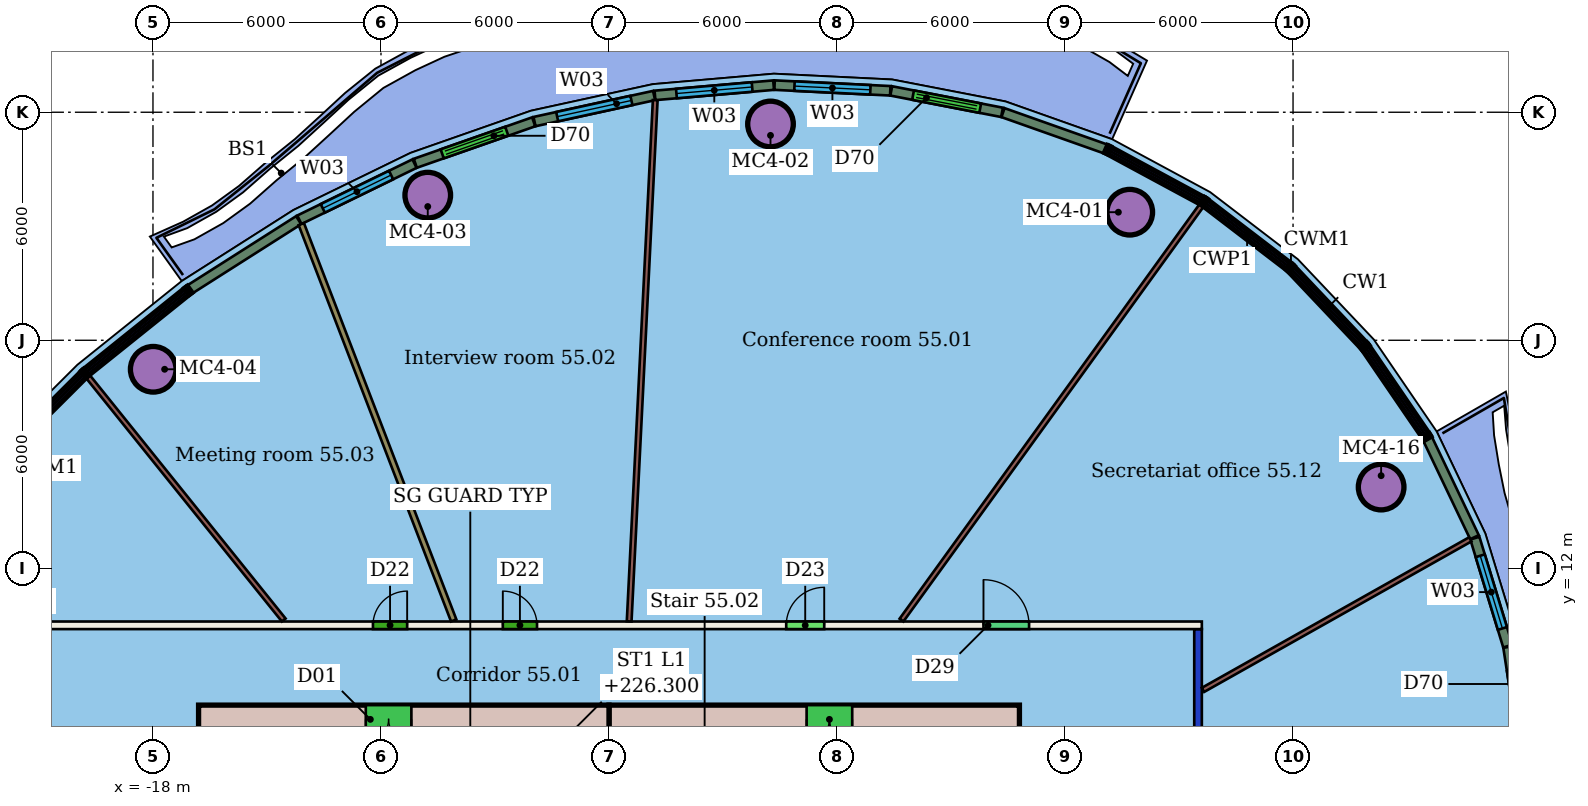
"""IFC4 building model, lengths in metres.
Left out: names, types, materials, properties, quantities, classifications, styles, units other than length and angle.
Written with IfcOpenShell. Run it as: python <this file> out.ifc"""

import sys

from ifc_helpers import new_model, si_unit, direction, frame, frame_2d, origin, origin_2d, place, context, subcontext, project, spatial, rectangle, hollow_circle, extrude, element, fill, save


model = new_model("IFC4")
c1 = context("Model", 3, precision=1e-05, world=origin(), true_north=direction((0.0, 1.0)))
c2 = subcontext(c1, "Body", "Model", "MODEL_VIEW")
j1 = project(units=[si_unit("LENGTHUNIT", "METRE"), si_unit("PLANEANGLEUNIT", "RADIAN")], contexts=[c1])
p1 = place(None, origin())
s1 = spatial("IfcSite", under=j1, at=p1, CompositionType="ELEMENT")
p2 = place(p1, origin())
s2 = spatial("IfcBuilding", under=s1, at=p2, CompositionType="ELEMENT")
p3 = place(p2, frame((0.0, 0.0, 224.5)))
s3 = spatial("IfcBuildingStorey", under=s2, at=p3, CompositionType="ELEMENT", Elevation=224.5)
for number, where, z_axis, x_axis in (
    (1, (7.704, 21.37, 0.0), (0.0, 0.0, 1.0), (1.0, 0.0, 0.0)),
    (2, (-1.75, 23.691, 0.0), (0.0, 0.0, 1.0), (1.0, 0.0, 0.0)),
    (3, (-10.769, 21.819, 0.0), (0.0, 0.0, 1.0), (1.0, 0.0, 0.0)),
    (4, (-17.993, 17.237, 0.0), (0.0, 0.0, 1.0), (1.0, 0.0, 0.0)),
    (5, (14.318, 14.137, 0.0), (0.0, 0.0, 1.0), (1.0, 0.0, 0.0)),
):
    element("IfcColumn", number, at=place(p3, frame(where, z_axis=z_axis, x_axis=x_axis)), inside=s3, PredefinedType="COLUMN", context=c2, shape_type="SweptSolid", body=[
        extrude(hollow_circle(Radius=0.6, WallThickness=0.045, at=origin_2d()), origin(), (0.0, 0.0, 1.0), 3.45),
    ])
p4 = place(p3, frame((-21.6, 10.5, 0.0), z_axis=(0.0, 0.0, 1.0), x_axis=(1.0, 0.0, 0.0)))
e6 = element("IfcWall", 6, at=p4, inside=s3, PredefinedType="PARTITIONING", context=c2, shape_type="SweptSolid", body=[
    extrude(rectangle(XDim=31.2, YDim=0.2, at=frame_2d((15.6, 0.0))), origin(), (0.0, 0.0, 1.0), 3.45),
])
p5 = place(p4, frame((20.263, 0.0, 0.0)))
e7 = element("IfcOpeningElement", 7, at=p5, cuts=e6, PredefinedType="OPENING", context=c2, shape_type="SweptSolid", body=[
    extrude(rectangle(XDim=1.0, YDim=2.4, at=frame_2d((0.5, 1.2))), frame((0.0, 0.11, 0.0), z_axis=(0.0, -1.0, 0.0), x_axis=(1.0, 0.0, 0.0)), (0.0, 0.0, 1.0), 0.22),
])
p6 = place(p4, frame((12.806, 0.0, 0.0)))
e8 = element("IfcOpeningElement", 8, at=p6, cuts=e6, PredefinedType="OPENING", context=c2, shape_type="SweptSolid", body=[
    extrude(rectangle(XDim=0.9, YDim=2.1, at=frame_2d((0.45, 1.05))), frame((0.0, 0.11, 0.0), z_axis=(0.0, -1.0, 0.0), x_axis=(1.0, 0.0, 0.0)), (0.0, 0.0, 1.0), 0.22),
])
p7 = place(p4, frame((9.389, 0.0, 0.0)))
e9 = element("IfcOpeningElement", 9, at=p7, cuts=e6, PredefinedType="OPENING", context=c2, shape_type="SweptSolid", body=[
    extrude(rectangle(XDim=0.9, YDim=2.1, at=frame_2d((0.45, 1.05))), frame((0.0, 0.11, 0.0), z_axis=(0.0, -1.0, 0.0), x_axis=(1.0, 0.0, 0.0)), (0.0, 0.0, 1.0), 0.22),
])
p8 = place(p4, frame((25.454, 0.0, 0.0)))
e10 = element("IfcOpeningElement", 10, at=p8, cuts=e6, PredefinedType="OPENING", context=c2, shape_type="SweptSolid", body=[
    extrude(rectangle(XDim=1.2, YDim=2.4, at=frame_2d((0.6, 1.2))), frame((0.0, 0.11, 0.0), z_axis=(0.0, -1.0, 0.0), x_axis=(1.0, 0.0, 0.0)), (0.0, 0.0, 1.0), 0.22),
])
p9 = place(p3, frame((9.5, 10.4, 0.0), z_axis=(0.0, 0.0, 1.0), x_axis=(0.0, -1.0, 0.0)))
e11 = element("IfcWall", 11, at=p9, inside=s3, PredefinedType="PARTITIONING", context=c2, shape_type="SweptSolid", body=[
    extrude(rectangle(XDim=20.8, YDim=0.2, at=frame_2d((10.4, 0.0))), origin(), (0.0, 0.0, 1.0), 3.05),
])
p10 = place(p9, frame((13.631, 0.0, 0.0)))
e12 = element("IfcOpeningElement", 12, at=p10, cuts=e11, PredefinedType="OPENING", context=c2, shape_type="SweptSolid", body=[
    extrude(rectangle(XDim=0.9, YDim=2.1, at=frame_2d((0.45, 1.05))), frame((0.0, 0.11, 0.0), z_axis=(0.0, -1.0, 0.0), x_axis=(1.0, 0.0, 0.0)), (0.0, 0.0, 1.0), 0.22),
])
p11 = place(p9, frame((7.823, 0.0, 0.0)))
e13 = element("IfcOpeningElement", 13, at=p11, cuts=e11, PredefinedType="OPENING", context=c2, shape_type="SweptSolid", body=[
    extrude(rectangle(XDim=1.5, YDim=2.1, at=frame_2d((0.75, 1.05))), frame((0.0, 0.11, 0.0), z_axis=(0.0, -1.0, 0.0), x_axis=(1.0, 0.0, 0.0)), (0.0, 0.0, 1.0), 0.22),
])
p12 = place(p3, frame((9.588, 21.542, 0.0), z_axis=(0.0, 0.0, 1.0), x_axis=(-0.586235299026, -0.810140836013, 0.0)))
e14 = element("IfcWall", 14, at=p12, inside=s3, PredefinedType="PARTITIONING", context=c2, shape_type="SweptSolid", body=[
    extrude(rectangle(XDim=13.461, YDim=0.125, at=frame_2d((6.73, 0.0))), origin(), (0.0, 0.0, 1.0), 3.45),
])
p13 = place(p3, frame((-4.783, 24.319, 0.0), z_axis=(0.0, 0.0, 1.0), x_axis=(-0.049956237306, -0.998751407686, 0.0)))
e15 = element("IfcWall", 15, at=p13, inside=s3, PredefinedType="PARTITIONING", context=c2, shape_type="SweptSolid", body=[
    extrude(rectangle(XDim=13.733, YDim=0.125, at=frame_2d((6.866, 0.0))), origin(), (0.0, 0.0, 1.0), 3.45),
])
p14 = place(p3, frame((-14.097, 21.057, 0.0), z_axis=(0.0, 0.0, 1.0), x_axis=(0.358907338181, -0.93337319578, 0.0)))
e16 = element("IfcWall", 16, at=p14, inside=s3, PredefinedType="PARTITIONING", context=c2, shape_type="SweptSolid", body=[
    extrude(rectangle(XDim=11.174, YDim=0.15, at=frame_2d((5.587, 0.0))), origin(), (0.0, 0.0, 1.0), 3.45),
])
p15 = place(p3, frame((-19.706, 17.038, 0.0), z_axis=(0.0, 0.0, 1.0), x_axis=(0.626795529624, -0.77918378066, 0.0)))
e17 = element("IfcWall", 17, at=p15, inside=s3, PredefinedType="PARTITIONING", context=c2, shape_type="SweptSolid", body=[
    extrude(rectangle(XDim=8.212, YDim=0.125, at=frame_2d((4.106, 0.0))), origin(), (0.0, 0.0, 1.0), 3.45),
])
p16 = place(p3, frame((16.664, 12.761, 0.0), z_axis=(0.0, 0.0, 1.0), x_axis=(-0.871369479299, -0.490627384627, 0.0)))
e18 = element("IfcWall", 18, at=p16, inside=s3, PredefinedType="PARTITIONING", context=c2, shape_type="SweptSolid", body=[
    extrude(rectangle(XDim=8.072, YDim=0.125, at=frame_2d((4.036, 0.0))), origin(), (0.0, 0.0, 1.0), 3.45),
])
p17 = place(p3, frame((7.066, 23.035, 0.0), z_axis=(0.0, 0.0, 1.0), x_axis=(-0.942660771922, 0.333752406852, 0.0)))
e19 = element("IfcWall", 19, at=p17, inside=s3, PredefinedType="SOLIDWALL", context=c2, shape_type="SweptSolid", body=[
    extrude(rectangle(XDim=2.862, YDim=0.25, at=frame_2d((1.431, 0.0))), origin(), (0.0, 0.0, 1.0), 3.1),
])
p18 = place(p3, frame((4.342, 23.997, 0.0), z_axis=(0.0, 0.0, 1.0), x_axis=(-0.981754609907, 0.190152270366, 0.0)))
e20 = element("IfcWall", 20, at=p18, inside=s3, PredefinedType="SOLIDWALL", context=c2, shape_type="SweptSolid", body=[
    extrude(rectangle(XDim=2.97, YDim=0.25, at=frame_2d((1.485, 0.0))), origin(), (0.0, 0.0, 1.0), 3.1),
])
p19 = place(p18, frame((0.585, 0.0, 0.0)))
e21 = element("IfcOpeningElement", 21, at=p19, cuts=e20, PredefinedType="OPENING", context=c2, shape_type="SweptSolid", body=[
    extrude(rectangle(XDim=1.8, YDim=2.4, at=frame_2d((0.9, 1.2))), frame((0.0, 0.135, 0.0), z_axis=(0.0, -1.0, 0.0), x_axis=(1.0, 0.0, 0.0)), (0.0, 0.0, 1.0), 0.27),
])
p20 = place(p3, frame((1.401, 24.565, 0.0), z_axis=(0.0, 0.0, 1.0), x_axis=(-0.99880196675, 0.048934969263, 0.0)))
e22 = element("IfcWall", 22, at=p20, inside=s3, PredefinedType="SOLIDWALL", context=c2, shape_type="SweptSolid", body=[
    extrude(rectangle(XDim=3.048, YDim=0.25, at=frame_2d((1.524, 0.0))), origin(), (0.0, 0.0, 1.0), 3.1),
])
p21 = place(p20, frame((0.524, 0.0, 0.9)))
e23 = element("IfcOpeningElement", 23, at=p21, cuts=e22, PredefinedType="OPENING", context=c2, shape_type="SweptSolid", body=[
    extrude(rectangle(XDim=2.0, YDim=2.1, at=frame_2d((1.0, 1.05))), frame((0.0, 0.135, 0.0), z_axis=(0.0, -1.0, 0.0), x_axis=(1.0, 0.0, 0.0)), (0.0, 0.0, 1.0), 0.27),
])
p22 = place(p3, frame((-1.668, 24.713, 0.0), z_axis=(0.0, 0.0, 1.0), x_axis=(-0.996280822504, -0.086165670135, 0.0)))
e24 = element("IfcWall", 24, at=p22, inside=s3, PredefinedType="SOLIDWALL", context=c2, shape_type="SweptSolid", body=[
    extrude(rectangle(XDim=3.134, YDim=0.25, at=frame_2d((1.567, 0.0))), origin(), (0.0, 0.0, 1.0), 3.1),
])
p23 = place(p22, frame((0.567, 0.0, 0.9)))
e25 = element("IfcOpeningElement", 25, at=p23, cuts=e24, PredefinedType="OPENING", context=c2, shape_type="SweptSolid", body=[
    extrude(rectangle(XDim=2.0, YDim=2.1, at=frame_2d((1.0, 1.05))), frame((0.0, 0.135, 0.0), z_axis=(0.0, -1.0, 0.0), x_axis=(1.0, 0.0, 0.0)), (0.0, 0.0, 1.0), 0.27),
])
p24 = place(p3, frame((-4.814, 24.44, 0.0), z_axis=(0.0, 0.0, 1.0), x_axis=(-0.977051639929, -0.213002565507, 0.0)))
e26 = element("IfcWall", 26, at=p24, inside=s3, PredefinedType="SOLIDWALL", context=c2, shape_type="SweptSolid", body=[
    extrude(rectangle(XDim=3.22, YDim=0.25, at=frame_2d((1.61, 0.0))), origin(), (0.0, 0.0, 1.0), 3.1),
])
p25 = place(p24, frame((0.61, 0.0, 0.9)))
e27 = element("IfcOpeningElement", 27, at=p25, cuts=e26, PredefinedType="OPENING", context=c2, shape_type="SweptSolid", body=[
    extrude(rectangle(XDim=2.0, YDim=2.1, at=frame_2d((1.0, 1.05))), frame((0.0, 0.135, 0.0), z_axis=(0.0, -1.0, 0.0), x_axis=(1.0, 0.0, 0.0)), (0.0, 0.0, 1.0), 0.27),
])
p26 = place(p3, frame((-7.982, 23.748, 0.0), z_axis=(0.0, 0.0, 1.0), x_axis=(-0.943819136109, -0.330462461279, 0.0)))
e28 = element("IfcWall", 28, at=p26, inside=s3, PredefinedType="SOLIDWALL", context=c2, shape_type="SweptSolid", body=[
    extrude(rectangle(XDim=3.3, YDim=0.25, at=frame_2d((1.65, 0.0))), origin(), (0.0, 0.0, 1.0), 3.1),
])
p27 = place(p26, frame((0.75, 0.0, 0.0)))
e29 = element("IfcOpeningElement", 29, at=p27, cuts=e28, PredefinedType="OPENING", context=c2, shape_type="SweptSolid", body=[
    extrude(rectangle(XDim=1.8, YDim=2.4, at=frame_2d((0.9, 1.2))), frame((0.0, 0.135, 0.0), z_axis=(0.0, -1.0, 0.0), x_axis=(1.0, 0.0, 0.0)), (0.0, 0.0, 1.0), 0.27),
])
p28 = place(p3, frame((-11.118, 22.648, 0.0), z_axis=(0.0, 0.0, 1.0), x_axis=(-0.898829687596, -0.43829806376, 0.0)))
e30 = element("IfcWall", 30, at=p28, inside=s3, PredefinedType="SOLIDWALL", context=c2, shape_type="SweptSolid", body=[
    extrude(rectangle(XDim=3.371, YDim=0.25, at=frame_2d((1.686, 0.0))), origin(), (0.0, 0.0, 1.0), 3.1),
])
p29 = place(p28, frame((0.686, 0.0, 0.9)))
e31 = element("IfcOpeningElement", 31, at=p29, cuts=e30, PredefinedType="OPENING", context=c2, shape_type="SweptSolid", body=[
    extrude(rectangle(XDim=2.0, YDim=2.1, at=frame_2d((1.0, 1.05))), frame((0.0, 0.135, 0.0), z_axis=(0.0, -1.0, 0.0), x_axis=(1.0, 0.0, 0.0)), (0.0, 0.0, 1.0), 0.27),
])
p30 = place(p3, frame((-14.167, 21.16, 0.0), z_axis=(0.0, 0.0, 1.0), x_axis=(-0.843780310555, -0.536688724979, 0.0)))
e32 = element("IfcWall", 32, at=p30, inside=s3, PredefinedType="SOLIDWALL", context=c2, shape_type="SweptSolid", body=[
    extrude(rectangle(XDim=3.384, YDim=0.25, at=frame_2d((1.692, 0.0))), origin(), (0.0, 0.0, 1.0), 3.1),
])
p31 = place(p3, frame((18.123, 6.916, 0.0), z_axis=(0.0, 0.0, 1.0), x_axis=(-0.15305011878, 0.98821842785, 0.0)))
e33 = element("IfcWall", 33, at=p31, inside=s3, PredefinedType="SOLIDWALL", context=c2, shape_type="SweptSolid", body=[
    extrude(rectangle(XDim=3.048, YDim=0.25, at=frame_2d((1.524, 0.0))), origin(), (0.0, 0.0, 1.0), 3.1),
])
p32 = place(p31, frame((0.624, 0.0, 0.0)))
e34 = element("IfcOpeningElement", 34, at=p32, cuts=e33, PredefinedType="OPENING", context=c2, shape_type="SweptSolid", body=[
    extrude(rectangle(XDim=1.8, YDim=2.4, at=frame_2d((0.9, 1.2))), frame((0.0, 0.135, 0.0), z_axis=(0.0, -1.0, 0.0), x_axis=(1.0, 0.0, 0.0)), (0.0, 0.0, 1.0), 0.27),
])
p33 = place(p3, frame((17.651, 9.954, 0.0), z_axis=(0.0, 0.0, 1.0), x_axis=(-0.291704653899, 0.956508439531, 0.0)))
e35 = element("IfcWall", 35, at=p33, inside=s3, PredefinedType="SOLIDWALL", context=c2, shape_type="SweptSolid", body=[
    extrude(rectangle(XDim=2.969, YDim=0.25, at=frame_2d((1.485, 0.0))), origin(), (0.0, 0.0, 1.0), 3.1),
])
p34 = place(p33, frame((0.485, 0.0, 0.9)))
e36 = element("IfcOpeningElement", 36, at=p34, cuts=e35, PredefinedType="OPENING", context=c2, shape_type="SweptSolid", body=[
    extrude(rectangle(XDim=2.0, YDim=2.1, at=frame_2d((1.0, 1.05))), frame((0.0, 0.135, 0.0), z_axis=(0.0, -1.0, 0.0), x_axis=(1.0, 0.0, 0.0)), (0.0, 0.0, 1.0), 0.27),
])
p35 = place(p3, frame((16.775, 12.819, 0.0), z_axis=(0.0, 0.0, 1.0), x_axis=(-0.430486422768, 0.902597052849, 0.0)))
e37 = element("IfcWall", 37, at=p35, inside=s3, PredefinedType="SOLIDWALL", context=c2, shape_type="SweptSolid", body=[
    extrude(rectangle(XDim=2.862, YDim=0.25, at=frame_2d((1.431, 0.0))), origin(), (0.0, 0.0, 1.0), 3.1),
])
p36 = place(p3, frame((4.8, 8.025, 0.0), z_axis=(0.0, 0.0, 1.0), x_axis=(-1.0, 0.0, 0.0)))
e38 = element("IfcWall", 38, at=p36, inside=s3, PredefinedType="SHEAR", context=c2, shape_type="SweptSolid", body=[
    extrude(rectangle(XDim=10.8, YDim=0.75, at=frame_2d((5.4, 0.0))), origin(), (0.0, 0.0, 1.0), 3.3),
])
p37 = place(p36, frame((4.4, 0.0, 0.0)))
e39 = element("IfcOpeningElement", 39, at=p37, cuts=e38, PredefinedType="OPENING", context=c2, shape_type="SweptSolid", body=[
    extrude(rectangle(XDim=1.2, YDim=2.1, at=frame_2d((0.6, 1.05))), frame((0.0, 0.385, 0.0), z_axis=(0.0, -1.0, 0.0), x_axis=(1.0, 0.0, 0.0)), (0.0, 0.0, 1.0), 0.77),
])
p38 = place(p3, frame((-6.0, 8.025, 0.0), z_axis=(0.0, 0.0, 1.0), x_axis=(-1.0, 0.0, 0.0)))
e40 = element("IfcWall", 40, at=p38, inside=s3, PredefinedType="SHEAR", context=c2, shape_type="SweptSolid", body=[
    extrude(rectangle(XDim=10.8, YDim=0.75, at=frame_2d((5.4, 0.0))), origin(), (0.0, 0.0, 1.0), 3.3),
])
p39 = place(p38, frame((5.2, 0.0, 0.0)))
e41 = element("IfcOpeningElement", 41, at=p39, cuts=e40, PredefinedType="OPENING", context=c2, shape_type="SweptSolid", body=[
    extrude(rectangle(XDim=1.2, YDim=2.1, at=frame_2d((0.6, 1.05))), frame((0.0, 0.385, 0.0), z_axis=(0.0, -1.0, 0.0), x_axis=(1.0, 0.0, 0.0)), (0.0, 0.0, 1.0), 0.77),
])
p40 = place(p5, origin())
e42 = element("IfcDoor", 42, at=p40, inside=s3, OperationType="SINGLE_SWING_RIGHT", PredefinedType="DOOR", context=c2, shape_type="SweptSolid", body=[
    extrude(rectangle(XDim=1.0, YDim=2.4, at=frame_2d((0.5, 1.2))), frame((0.0, 0.025, 0.0), z_axis=(0.0, -1.0, 0.0), x_axis=(1.0, 0.0, 0.0)), (0.0, 0.0, 1.0), 0.05),
])
fill(e7, e42)
p41 = place(p6, origin())
e43 = element("IfcDoor", 43, at=p41, inside=s3, OperationType="SINGLE_SWING_LEFT", PredefinedType="DOOR", context=c2, shape_type="SweptSolid", body=[
    extrude(rectangle(XDim=0.9, YDim=2.1, at=frame_2d((0.45, 1.05))), frame((0.0, 0.025, 0.0), z_axis=(0.0, -1.0, 0.0), x_axis=(1.0, 0.0, 0.0)), (0.0, 0.0, 1.0), 0.05),
])
fill(e8, e43)
p42 = place(p7, origin())
e44 = element("IfcDoor", 44, at=p42, inside=s3, OperationType="SINGLE_SWING_RIGHT", PredefinedType="DOOR", context=c2, shape_type="SweptSolid", body=[
    extrude(rectangle(XDim=0.9, YDim=2.1, at=frame_2d((0.45, 1.05))), frame((0.0, 0.025, 0.0), z_axis=(0.0, -1.0, 0.0), x_axis=(1.0, 0.0, 0.0)), (0.0, 0.0, 1.0), 0.05),
])
fill(e9, e44)
p43 = place(p8, origin())
e45 = element("IfcDoor", 45, at=p43, inside=s3, OperationType="SINGLE_SWING_LEFT", PredefinedType="DOOR", context=c2, shape_type="SweptSolid", body=[
    extrude(rectangle(XDim=1.2, YDim=2.4, at=frame_2d((0.6, 1.2))), frame((0.0, 0.025, 0.0), z_axis=(0.0, -1.0, 0.0), x_axis=(1.0, 0.0, 0.0)), (0.0, 0.0, 1.0), 0.05),
])
fill(e10, e45)
p44 = place(p19, origin())
e46 = element("IfcDoor", 46, at=p44, inside=s3, OperationType="DOUBLE_DOOR_SLIDING", PredefinedType="DOOR", context=c2, shape_type="SweptSolid", body=[
    extrude(rectangle(XDim=1.8, YDim=2.4, at=frame_2d((0.9, 1.2))), frame((0.0, 0.025, 0.0), z_axis=(0.0, -1.0, 0.0), x_axis=(1.0, 0.0, 0.0)), (0.0, 0.0, 1.0), 0.05),
])
fill(e21, e46)
p45 = place(p21, origin())
e47 = element("IfcWindow", 47, at=p45, inside=s3, PartitioningType="SINGLE_PANEL", PredefinedType="WINDOW", context=c2, shape_type="SweptSolid", body=[
    extrude(rectangle(XDim=2.0, YDim=2.1, at=frame_2d((1.0, 1.05))), frame((0.0, 0.03, 0.0), z_axis=(0.0, -1.0, 0.0), x_axis=(1.0, 0.0, 0.0)), (0.0, 0.0, 1.0), 0.06),
])
fill(e23, e47)
p46 = place(p23, origin())
e48 = element("IfcWindow", 48, at=p46, inside=s3, PartitioningType="SINGLE_PANEL", PredefinedType="WINDOW", context=c2, shape_type="SweptSolid", body=[
    extrude(rectangle(XDim=2.0, YDim=2.1, at=frame_2d((1.0, 1.05))), frame((0.0, 0.03, 0.0), z_axis=(0.0, -1.0, 0.0), x_axis=(1.0, 0.0, 0.0)), (0.0, 0.0, 1.0), 0.06),
])
fill(e25, e48)
p47 = place(p25, origin())
e49 = element("IfcWindow", 49, at=p47, inside=s3, PartitioningType="SINGLE_PANEL", PredefinedType="WINDOW", context=c2, shape_type="SweptSolid", body=[
    extrude(rectangle(XDim=2.0, YDim=2.1, at=frame_2d((1.0, 1.05))), frame((0.0, 0.03, 0.0), z_axis=(0.0, -1.0, 0.0), x_axis=(1.0, 0.0, 0.0)), (0.0, 0.0, 1.0), 0.06),
])
fill(e27, e49)
p48 = place(p27, origin())
e50 = element("IfcDoor", 50, at=p48, inside=s3, OperationType="DOUBLE_DOOR_SLIDING", PredefinedType="DOOR", context=c2, shape_type="SweptSolid", body=[
    extrude(rectangle(XDim=1.8, YDim=2.4, at=frame_2d((0.9, 1.2))), frame((0.0, 0.025, 0.0), z_axis=(0.0, -1.0, 0.0), x_axis=(1.0, 0.0, 0.0)), (0.0, 0.0, 1.0), 0.05),
])
fill(e29, e50)
p49 = place(p29, origin())
e51 = element("IfcWindow", 51, at=p49, inside=s3, PartitioningType="SINGLE_PANEL", PredefinedType="WINDOW", context=c2, shape_type="SweptSolid", body=[
    extrude(rectangle(XDim=2.0, YDim=2.1, at=frame_2d((1.0, 1.05))), frame((0.0, 0.03, 0.0), z_axis=(0.0, -1.0, 0.0), x_axis=(1.0, 0.0, 0.0)), (0.0, 0.0, 1.0), 0.06),
])
fill(e31, e51)
p50 = place(p34, origin())
e52 = element("IfcWindow", 52, at=p50, inside=s3, PartitioningType="SINGLE_PANEL", PredefinedType="WINDOW", context=c2, shape_type="SweptSolid", body=[
    extrude(rectangle(XDim=2.0, YDim=2.1, at=frame_2d((1.0, 1.05))), frame((0.0, 0.03, 0.0), z_axis=(0.0, -1.0, 0.0), x_axis=(1.0, 0.0, 0.0)), (0.0, 0.0, 1.0), 0.06),
])
fill(e36, e52)
p51 = place(p37, origin())
e53 = element("IfcDoor", 53, at=p51, inside=s3, OperationType="DOUBLE_DOOR_SINGLE_SWING", PredefinedType="NOTDEFINED", context=c2, shape_type="SweptSolid", body=[
    extrude(rectangle(XDim=1.2, YDim=2.1, at=frame_2d((0.6, 1.05))), frame((0.0, 0.025, 0.0), z_axis=(0.0, -1.0, 0.0), x_axis=(1.0, 0.0, 0.0)), (0.0, 0.0, 1.0), 0.05),
])
fill(e39, e53)
p52 = place(p39, origin())
e54 = element("IfcDoor", 54, at=p52, inside=s3, OperationType="DOUBLE_DOOR_SINGLE_SWING", PredefinedType="NOTDEFINED", context=c2, shape_type="SweptSolid", body=[
    extrude(rectangle(XDim=1.2, YDim=2.1, at=frame_2d((0.6, 1.05))), frame((0.0, 0.025, 0.0), z_axis=(0.0, -1.0, 0.0), x_axis=(1.0, 0.0, 0.0)), (0.0, 0.0, 1.0), 0.05),
])
fill(e41, e54)
save(model, sys.argv[1])
